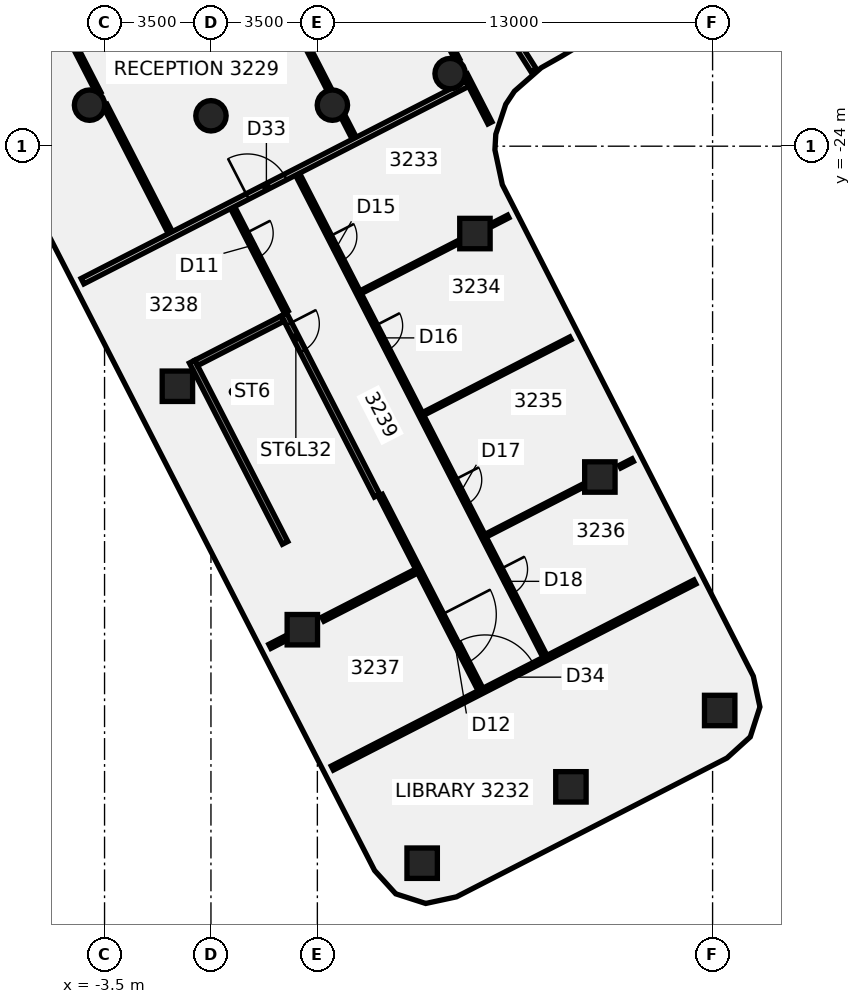
"""IFC4 building model, lengths in metres.
Left out: names, types, materials, properties, quantities, classifications, styles, units other than length and angle.
Written with IfcOpenShell. Run it as: python <this file> out.ifc"""

import sys

from ifc_helpers import new_model, si_unit, direction, frame, frame_2d, origin, origin_2d, place, context, subcontext, project, spatial, polyline, rectangle, circle, outline, extrude, element, fill, save


model = new_model("IFC4")
c1 = context("Model", 3, precision=1e-05, world=origin(), true_north=direction((0.0, 1.0)))
c2 = subcontext(c1, "Body", "Model", "MODEL_VIEW")
j1 = project(units=[si_unit("LENGTHUNIT", "METRE"), si_unit("PLANEANGLEUNIT", "RADIAN")], contexts=[c1])
p1 = place(None, origin())
s1 = spatial("IfcSite", under=j1, at=p1, CompositionType="ELEMENT")
p2 = place(p1, origin())
s2 = spatial("IfcBuilding", under=s1, at=p2, CompositionType="ELEMENT")
p3 = place(p2, frame((0.0, 0.0, 133.0)))
s3 = spatial("IfcBuildingStorey", under=s2, at=p3, CompositionType="ELEMENT", Elevation=133.0)
for number, where, z_axis, x_axis in (
    (1, (-3.994, -22.651, -0.14), (0.0, 0.0, 1.0), (1.0, 0.0, 0.0)),
    (2, (0.0, -23.0, -0.14), (0.0, 0.0, 1.0), (1.0, 0.0, 0.0)),
    (3, (3.994, -22.651, -0.14), (0.0, 0.0, 1.0), (1.0, 0.0, 0.0)),
    (4, (7.866, -21.613, -0.14), (0.0, 0.0, 1.0), (1.0, 0.0, 0.0)),
):
    element("IfcColumn", number, at=place(p3, frame(where, z_axis=z_axis, x_axis=x_axis)), inside=s3, PredefinedType="COLUMN", context=c2, shape_type="SweptSolid", body=[
        extrude(circle(Radius=0.5, at=origin_2d()), origin(), (0.0, 0.0, 1.0), 3.75),
    ])
p4 = place(p3, frame((12.792, -34.88, -0.134), z_axis=(0.061871859426, 0.062521773916, 0.996123938472), x_axis=(-0.887299968667, -0.453556116001, 0.083579993069)))
e5 = element("IfcColumn", 5, at=p4, inside=s3, PredefinedType="COLUMN", context=c2, shape_type="SweptSolid", body=[
    extrude(rectangle(XDim=1.0, YDim=1.0, at=origin_2d()), origin(), (0.0, 0.0, 1.0), 3.757),
])
p5 = place(p3, frame((3.006, -39.903, -0.134), z_axis=(0.086557736741, 0.015336055459, 0.996128788668), x_axis=(-0.455375187571, 0.889923738813, 0.025868468099)))
e6 = element("IfcColumn", 6, at=p5, inside=s3, PredefinedType="COLUMN", context=c2, shape_type="SweptSolid", body=[
    extrude(rectangle(XDim=1.0, YDim=1.0, at=origin_2d()), origin(), (0.0, 0.0, 1.0), 3.757),
])
p6 = place(p3, frame((8.683, -26.873, -0.136), z_axis=(0.023249815242, 0.042396721911, 0.99883029793), x_axis=(-0.888891864763, -0.45636204272, 0.040061686479)))
e7 = element("IfcColumn", 7, at=p6, inside=s3, PredefinedType="COLUMN", context=c2, shape_type="SweptSolid", body=[
    extrude(rectangle(XDim=1.0, YDim=1.0, at=origin_2d()), origin(), (0.0, 0.0, 1.0), 3.749),
])
p7 = place(p3, frame((-1.104, -31.896, -0.136), z_axis=(0.048124572307, -0.004949211766, 0.998829079895), x_axis=(-0.455474581289, 0.889858610868, 0.026354477116)))
e8 = element("IfcColumn", 8, at=p7, inside=s3, PredefinedType="COLUMN", context=c2, shape_type="SweptSolid", body=[
    extrude(rectangle(XDim=1.0, YDim=1.0, at=origin_2d()), origin(), (0.0, 0.0, 1.0), 3.749),
])
p8 = place(p3, frame((6.947, -47.583, -0.131), z_axis=(0.130025765362, 0.021573490305, 0.991275887358), x_axis=(-0.454113091891, 0.890036848371, 0.04019587435)))
e9 = element("IfcColumn", 9, at=p8, inside=s3, PredefinedType="COLUMN", context=c2, shape_type="SweptSolid", body=[
    extrude(rectangle(XDim=1.0, YDim=1.0, at=origin_2d()), origin(), (0.0, 0.0, 1.0), 3.757),
])
p9 = place(p3, frame((11.84, -45.071, -0.133), z_axis=(0.117801332946, 0.045053158792, 0.992014646484), x_axis=(-0.455693217506, 0.890031586101, 0.013691868468)))
e10 = element("IfcColumn", 10, at=p9, inside=s3, PredefinedType="COLUMN", context=c2, shape_type="SweptSolid", body=[
    extrude(rectangle(XDim=1.0, YDim=1.0, at=origin_2d()), origin(), (0.0, 0.0, 1.0), 3.755),
])
p10 = place(p3, frame((16.733, -42.56, -0.132), z_axis=(0.105474361583, 0.068538826824, 0.992057250498), x_axis=(-0.883135905889, -0.452121084233, 0.125129920171)))
e11 = element("IfcColumn", 11, at=p10, inside=s3, PredefinedType="COLUMN", context=c2, shape_type="SweptSolid", body=[
    extrude(rectangle(XDim=1.0, YDim=1.0, at=origin_2d()), origin(), (0.0, 0.0, 1.0), 3.754),
])
p11 = place(p3, frame((-8.956, -11.993, 0.0), z_axis=(0.0, 0.0, 1.0), x_axis=(0.456540854067, -0.889702449456, 0.0)))
e12 = element("IfcWall", 12, at=p11, inside=s3, PredefinedType="PARTITIONING", context=c2, shape_type="SweptSolid", body=[
    extrude(rectangle(XDim=11.539, YDim=0.15, at=frame_2d((5.77, 0.0))), origin(), (0.0, 0.0, 1.0), 3.01),
])
p12 = place(p11, frame((5.195, 0.0, 0.0)))
e13 = element("IfcOpeningElement", 13, at=p12, cuts=e12, PredefinedType="OPENING", context=c2, shape_type="SweptSolid", body=[
    extrude(rectangle(XDim=1.8, YDim=2.1, at=frame_2d((0.9, 1.05))), frame((0.0, 0.085, 0.0), z_axis=(0.0, -1.0, 0.0), x_axis=(1.0, 0.0, 0.0)), (0.0, 0.0, 1.0), 0.17),
])
p13 = place(p3, frame((-3.485, -22.655, 0.0), z_axis=(0.0, 0.0, 1.0), x_axis=(0.456522971759, -0.889711625335, 0.0)))
e14 = element("IfcWall", 14, at=p13, inside=s3, PredefinedType="PARTITIONING", context=c2, shape_type="SweptSolid", body=[
    extrude(rectangle(XDim=4.708, YDim=0.15, at=frame_2d((2.354, 0.0))), origin(), (0.0, 0.0, 1.0), 3.01),
])
p14 = place(p3, frame((-1.313, -11.993, 0.0), z_axis=(0.0, 0.0, 1.0), x_axis=(0.456517816725, -0.889714270433, 0.0)))
e15 = element("IfcWall", 15, at=p14, inside=s3, PredefinedType="PARTITIONING", context=c2, shape_type="SweptSolid", body=[
    extrude(rectangle(XDim=11.432, YDim=0.15, at=frame_2d((5.716, 0.0))), origin(), (0.0, 0.0, 1.0), 3.01),
])
p15 = place(p14, frame((3.645, 0.0, 0.0)))
e16 = element("IfcOpeningElement", 16, at=p15, cuts=e15, PredefinedType="OPENING", context=c2, shape_type="SweptSolid", body=[
    extrude(rectangle(XDim=0.9, YDim=2.1, at=frame_2d((0.45, 1.05))), frame((0.0, 0.085, 0.0), z_axis=(0.0, -1.0, 0.0), x_axis=(1.0, 0.0, 0.0)), (0.0, 0.0, 1.0), 0.17),
])
p16 = place(p3, frame((4.337, -23.004, 0.0), z_axis=(0.0, 0.0, 1.0), x_axis=(0.456575953503, -0.889684437698, 0.0)))
e17 = element("IfcWall", 17, at=p16, inside=s3, PredefinedType="PARTITIONING", context=c2, shape_type="SweptSolid", body=[
    extrude(rectangle(XDim=0.822, YDim=0.15, at=frame_2d((0.411, 0.0))), origin(), (0.0, 0.0, 1.0), 3.01),
])
p17 = place(p3, frame((0.713, -26.018, 0.0), z_axis=(0.0, 0.0, 1.0), x_axis=(0.456676166245, -0.889633002526, 0.0)))
e18 = element("IfcWall", 18, at=p17, inside=s3, PredefinedType="PARTITIONING", context=c2, shape_type="SweptSolid", body=[
    extrude(rectangle(XDim=3.86, YDim=0.15, at=frame_2d((1.93, 0.0))), origin(), (0.0, 0.0, 1.0), 3.01),
])
p18 = place(p17, frame((0.95, 0.0, 0.0)))
e19 = element("IfcOpeningElement", 19, at=p18, cuts=e18, PredefinedType="OPENING", context=c2, shape_type="SweptSolid", body=[
    extrude(rectangle(XDim=0.9, YDim=2.1, at=frame_2d((0.45, 1.05))), frame((0.0, 0.085, 0.0), z_axis=(0.0, -1.0, 0.0), x_axis=(1.0, 0.0, 0.0)), (0.0, 0.0, 1.0), 0.17),
])
p19 = place(p3, frame((5.572, -35.484, 0.0), z_axis=(0.0, 0.0, 1.0), x_axis=(0.456649146852, -0.889646871899, 0.0)))
e20 = element("IfcWall", 20, at=p19, inside=s3, PredefinedType="PARTITIONING", context=c2, shape_type="SweptSolid", body=[
    extrude(rectangle(XDim=7.184, YDim=0.15, at=frame_2d((3.592, 0.0))), origin(), (0.0, 0.0, 1.0), 3.01),
])
p20 = place(p19, frame((4.41, 0.0, 0.0)))
e21 = element("IfcOpeningElement", 21, at=p20, cuts=e20, PredefinedType="OPENING", context=c2, shape_type="SweptSolid", body=[
    extrude(rectangle(XDim=1.8, YDim=2.1, at=frame_2d((0.9, 1.05))), frame((0.0, 0.085, 0.0), z_axis=(0.0, -1.0, 0.0), x_axis=(1.0, 0.0, 0.0)), (0.0, 0.0, 1.0), 0.17),
])
p21 = place(p3, frame((2.849, -24.922, 0.0), z_axis=(0.0, 0.0, 1.0), x_axis=(0.456500214421, -0.889723302063, 0.0)))
e22 = element("IfcWall", 22, at=p21, inside=s3, PredefinedType="PARTITIONING", context=c2, shape_type="SweptSolid", body=[
    extrude(rectangle(XDim=17.82, YDim=0.15, at=frame_2d((8.91, 0.0))), origin(), (0.0, 0.0, 1.0), 3.01),
])
p22 = place(p21, frame((2.3, 0.0, 0.0)))
e23 = element("IfcOpeningElement", 23, at=p22, cuts=e22, PredefinedType="OPENING", context=c2, shape_type="SweptSolid", body=[
    extrude(rectangle(XDim=0.9, YDim=2.1, at=frame_2d((0.45, 1.05))), frame((0.0, 0.085, 0.0), z_axis=(0.0, -1.0, 0.0), x_axis=(1.0, 0.0, 0.0)), (0.0, 0.0, 1.0), 0.17),
])
p23 = place(p21, frame((5.6, 0.0, 0.0)))
e24 = element("IfcOpeningElement", 24, at=p23, cuts=e22, PredefinedType="OPENING", context=c2, shape_type="SweptSolid", body=[
    extrude(rectangle(XDim=0.9, YDim=2.1, at=frame_2d((0.45, 1.05))), frame((0.0, 0.085, 0.0), z_axis=(0.0, -1.0, 0.0), x_axis=(1.0, 0.0, 0.0)), (0.0, 0.0, 1.0), 0.17),
])
p24 = place(p21, frame((11.299, 0.0, 0.0)))
e25 = element("IfcOpeningElement", 25, at=p24, cuts=e22, PredefinedType="OPENING", context=c2, shape_type="SweptSolid", body=[
    extrude(rectangle(XDim=0.9, YDim=2.1, at=frame_2d((0.45, 1.05))), frame((0.0, 0.085, 0.0), z_axis=(0.0, -1.0, 0.0), x_axis=(1.0, 0.0, 0.0)), (0.0, 0.0, 1.0), 0.17),
])
p25 = place(p21, frame((14.6, 0.0, 0.0)))
e26 = element("IfcOpeningElement", 26, at=p25, cuts=e22, PredefinedType="OPENING", context=c2, shape_type="SweptSolid", body=[
    extrude(rectangle(XDim=0.9, YDim=2.1, at=frame_2d((0.45, 1.05))), frame((0.0, 0.085, 0.0), z_axis=(0.0, -1.0, 0.0), x_axis=(1.0, 0.0, 0.0)), (0.0, 0.0, 1.0), 0.17),
])
p26 = place(p3, frame((3.407, -11.993, 0.0), z_axis=(0.0, 0.0, 1.0), x_axis=(0.456609270215, -0.889667339152, 0.0)))
e27 = element("IfcWall", 27, at=p26, inside=s3, PredefinedType="PARTITIONING", context=c2, shape_type="SweptSolid", body=[
    extrude(rectangle(XDim=10.314, YDim=0.15, at=frame_2d((5.157, 0.0))), origin(), (0.0, 0.0, 1.0), 3.01),
])
p27 = place(p3, frame((8.365, -21.655, 0.0), z_axis=(0.0, 0.0, 1.0), x_axis=(0.456704681847, -0.889618364007, 0.0)))
e28 = element("IfcWall", 28, at=p27, inside=s3, PredefinedType="PARTITIONING", context=c2, shape_type="SweptSolid", body=[
    extrude(rectangle(XDim=1.775, YDim=0.15, at=frame_2d((0.888, 0.0))), origin(), (0.0, 0.0, 1.0), 3.01),
])
p28 = place(p3, frame((-4.225, -28.439, 0.0), z_axis=(0.0, 0.0, 1.0), x_axis=(0.889694266908, 0.456556799787, 0.0)))
e29 = element("IfcWall", 29, at=p28, inside=s3, PredefinedType="PARTITIONING", context=c2, shape_type="SweptSolid", body=[
    extrude(rectangle(XDim=14.219, YDim=0.2, at=frame_2d((7.11, 0.0))), origin(), (0.0, 0.0, 1.0), 3.01),
])
p29 = place(p28, frame((6.099, 0.0, 0.0)))
e30 = element("IfcOpeningElement", 30, at=p29, cuts=e29, PredefinedType="OPENING", context=c2, shape_type="SweptSolid", body=[
    extrude(rectangle(XDim=1.4, YDim=2.1, at=frame_2d((0.7, 1.05))), frame((0.0, 0.11, 0.0), z_axis=(0.0, -1.0, 0.0), x_axis=(1.0, 0.0, 0.0)), (0.0, 0.0, 1.0), 0.22),
])
p30 = place(p3, frame((1.938, -40.45, 0.0), z_axis=(0.0, 0.0, 1.0), x_axis=(0.889784233191, 0.456381439549, 0.0)))
e31 = element("IfcWall", 31, at=p30, inside=s3, PredefinedType="PARTITIONING", context=c2, shape_type="SweptSolid", body=[
    extrude(rectangle(XDim=0.765, YDim=0.15, at=frame_2d((0.382, 0.0))), origin(), (0.0, 0.0, 1.0), 3.01),
])
p31 = place(p3, frame((3.683, -39.555, 0.0), z_axis=(0.0, 0.0, 1.0), x_axis=(0.889712502977, 0.456521261331, 0.0)))
e32 = element("IfcWall", 32, at=p31, inside=s3, PredefinedType="PARTITIONING", context=c2, shape_type="SweptSolid", body=[
    extrude(rectangle(XDim=3.464, YDim=0.15, at=frame_2d((1.732, 0.0))), origin(), (0.0, 0.0, 1.0), 3.01),
])
p32 = place(p3, frame((9.033, -36.81, 0.0), z_axis=(0.0, 0.0, 1.0), x_axis=(0.889728687262, 0.456489718464, 0.0)))
e33 = element("IfcWall", 33, at=p32, inside=s3, PredefinedType="PARTITIONING", context=c2, shape_type="SweptSolid", body=[
    extrude(rectangle(XDim=3.78, YDim=0.1, at=frame_2d((1.89, 0.0))), origin(), (0.0, 0.0, 1.0), 3.01),
])
p33 = place(p3, frame((13.458, -34.54, 0.0), z_axis=(0.0, 0.0, 1.0), x_axis=(0.889768357332, 0.456412390598, 0.0)))
e34 = element("IfcWall", 34, at=p33, inside=s3, PredefinedType="PARTITIONING", context=c2, shape_type="SweptSolid", body=[
    extrude(rectangle(XDim=0.466, YDim=0.1, at=frame_2d((0.233, 0.0))), origin(), (0.0, 0.0, 1.0), 3.01),
])
p34 = place(p3, frame((3.993, -44.454, 0.0), z_axis=(0.0, 0.0, 1.0), x_axis=(0.889693799485, 0.456557710655, 0.0)))
e35 = element("IfcWall", 35, at=p34, inside=s3, PredefinedType="PARTITIONING", context=c2, shape_type="SweptSolid", body=[
    extrude(rectangle(XDim=13.405, YDim=0.15, at=frame_2d((6.703, 0.0))), origin(), (0.0, 0.0, 1.0), 3.01),
])
p35 = place(p34, frame((5.649, 0.0, 0.0)))
e36 = element("IfcOpeningElement", 36, at=p35, cuts=e35, PredefinedType="OPENING", context=c2, shape_type="SweptSolid", body=[
    extrude(rectangle(XDim=1.8, YDim=2.1, at=frame_2d((0.9, 1.05))), frame((0.0, 0.085, 0.0), z_axis=(0.0, -1.0, 0.0), x_axis=(1.0, 0.0, 0.0)), (0.0, 0.0, 1.0), 0.17),
])
p36 = place(p3, frame((4.928, -28.801, 0.0), z_axis=(0.0, 0.0, 1.0), x_axis=(0.88969767161, 0.456550164968, 0.0)))
e37 = element("IfcWall", 37, at=p36, inside=s3, PredefinedType="PARTITIONING", context=c2, shape_type="SweptSolid", body=[
    extrude(rectangle(XDim=3.693, YDim=0.1, at=frame_2d((1.846, 0.0))), origin(), (0.0, 0.0, 1.0), 3.01),
])
p37 = place(p3, frame((9.276, -26.57, 0.0), z_axis=(0.0, 0.0, 1.0), x_axis=(0.889533786381, 0.456869393686, 0.0)))
e38 = element("IfcWall", 38, at=p37, inside=s3, PredefinedType="PARTITIONING", context=c2, shape_type="SweptSolid", body=[
    extrude(rectangle(XDim=0.565, YDim=0.1, at=frame_2d((0.282, 0.0))), origin(), (0.0, 0.0, 1.0), 3.01),
])
p38 = place(p3, frame((6.982, -32.803, 0.0), z_axis=(0.0, 0.0, 1.0), x_axis=(0.889704900223, 0.456536078004, 0.0)))
e39 = element("IfcWall", 39, at=p38, inside=s3, PredefinedType="PARTITIONING", context=c2, shape_type="SweptSolid", body=[
    extrude(rectangle(XDim=5.443, YDim=0.1, at=frame_2d((2.722, 0.0))), origin(), (0.0, 0.0, 1.0), 3.01),
])
p39 = place(p3, frame((8.073, -17.482, 0.0), z_axis=(0.0, 0.0, 1.0), x_axis=(0.534101065581, -0.845420635982, 0.0)))
e40 = element("IfcWall", 40, at=p39, inside=s3, PredefinedType="SOLIDWALL", context=c2, shape_type="SweptSolid", body=[
    extrude(rectangle(XDim=4.759, YDim=0.2, at=frame_2d((2.38, 0.0))), origin(), (0.0, 0.0, 1.0), 3.61),
])
p40 = place(p3, frame((2.405, -29.533, -0.14), z_axis=(0.0, 0.0, 1.0), x_axis=(0.456546705756, -0.889699446703, 0.0)))
e41 = element("IfcWall", 41, at=p40, inside=s3, PredefinedType="SHEAR", context=c2, shape_type="SweptSolid", body=[
    extrude(rectangle(XDim=6.7, YDim=0.2, at=frame_2d((3.35, 0.0))), origin(), (0.0, 0.0, 1.0), 3.15),
])
p41 = place(p40, frame((0.35, 0.0, 0.0)))
e42 = element("IfcOpeningElement", 42, at=p41, cuts=e41, PredefinedType="OPENING", context=c2, shape_type="SweptSolid", body=[
    extrude(rectangle(XDim=1.0, YDim=2.1, at=frame_2d((0.5, 1.05))), frame((0.0, 0.11, 0.0), z_axis=(0.0, -1.0, 0.0), x_axis=(1.0, 0.0, 0.0)), (0.0, 0.0, 1.0), 0.22),
])
p42 = place(p3, frame((-0.621, -31.085, -0.14), z_axis=(0.0, 0.0, 1.0), x_axis=(0.456575549033, -0.889684645268, 0.0)))
e43 = element("IfcWall", 43, at=p42, inside=s3, PredefinedType="SHEAR", context=c2, shape_type="SweptSolid", body=[
    extrude(rectangle(XDim=6.7, YDim=0.2, at=frame_2d((3.35, 0.0))), origin(), (0.0, 0.0, 1.0), 3.15),
])
p43 = place(p3, frame((-0.486, -31.129, -0.14), z_axis=(0.0, 0.0, 1.0), x_axis=(0.889693512727, 0.456558269459, 0.0)))
e44 = element("IfcWall", 44, at=p43, inside=s3, PredefinedType="SHEAR", context=c2, shape_type="SweptSolid", body=[
    extrude(rectangle(XDim=3.2, YDim=0.2, at=frame_2d((1.6, 0.0))), origin(), (0.0, 0.0, 1.0), 3.15),
])
p44 = place(p3, frame((0.0, 0.0, -0.14)))
e45 = element("IfcWall", 45, at=p44, inside=s3, PredefinedType="SHEAR", context=c2, shape_type="SweptSolid", body=[
    extrude(outline(polyline([(2.436, -36.823), (2.527, -37.001), (5.375, -35.54), (5.283, -35.362), (2.436, -36.823)])), origin(), (0.0, 0.0, 1.0), 3.15),
])
p45 = place(p18, frame((0.9, 0.0, 0.0), z_axis=(0.0, 0.0, 1.0), x_axis=(-1.0, 0.0, 0.0)))
e46 = element("IfcDoor", 46, at=p45, inside=s3, OperationType="SINGLE_SWING_LEFT", PredefinedType="DOOR", context=c2, shape_type="SweptSolid", body=[
    extrude(rectangle(XDim=0.9, YDim=2.1, at=frame_2d((0.45, 1.05))), frame((0.0, 0.025, 0.0), z_axis=(0.0, -1.0, 0.0), x_axis=(1.0, 0.0, 0.0)), (0.0, 0.0, 1.0), 0.05),
])
fill(e19, e46)
p46 = place(p20, frame((1.8, 0.0, 0.0), z_axis=(0.0, 0.0, 1.0), x_axis=(-1.0, 0.0, 0.0)))
e47 = element("IfcDoor", 47, at=p46, inside=s3, OperationType="DOUBLE_DOOR_SINGLE_SWING", PredefinedType="DOOR", context=c2, shape_type="SweptSolid", body=[
    extrude(rectangle(XDim=1.8, YDim=2.1, at=frame_2d((0.9, 1.05))), frame((0.0, 0.025, 0.0), z_axis=(0.0, -1.0, 0.0), x_axis=(1.0, 0.0, 0.0)), (0.0, 0.0, 1.0), 0.05),
])
fill(e21, e47)
p47 = place(p22, origin())
e48 = element("IfcDoor", 48, at=p47, inside=s3, OperationType="SINGLE_SWING_RIGHT", PredefinedType="DOOR", context=c2, shape_type="SweptSolid", body=[
    extrude(rectangle(XDim=0.9, YDim=2.1, at=frame_2d((0.45, 1.05))), frame((0.0, 0.025, 0.0), z_axis=(0.0, -1.0, 0.0), x_axis=(1.0, 0.0, 0.0)), (0.0, 0.0, 1.0), 0.05),
])
fill(e23, e48)
p48 = place(p23, origin())
e49 = element("IfcDoor", 49, at=p48, inside=s3, OperationType="SINGLE_SWING_RIGHT", PredefinedType="DOOR", context=c2, shape_type="SweptSolid", body=[
    extrude(rectangle(XDim=0.9, YDim=2.1, at=frame_2d((0.45, 1.05))), frame((0.0, 0.025, 0.0), z_axis=(0.0, -1.0, 0.0), x_axis=(1.0, 0.0, 0.0)), (0.0, 0.0, 1.0), 0.05),
])
fill(e24, e49)
p49 = place(p24, origin())
e50 = element("IfcDoor", 50, at=p49, inside=s3, OperationType="SINGLE_SWING_LEFT", PredefinedType="DOOR", context=c2, shape_type="SweptSolid", body=[
    extrude(rectangle(XDim=0.9, YDim=2.1, at=frame_2d((0.45, 1.05))), frame((0.0, 0.025, 0.0), z_axis=(0.0, -1.0, 0.0), x_axis=(1.0, 0.0, 0.0)), (0.0, 0.0, 1.0), 0.05),
])
fill(e25, e50)
p50 = place(p25, origin())
e51 = element("IfcDoor", 51, at=p50, inside=s3, OperationType="SINGLE_SWING_LEFT", PredefinedType="DOOR", context=c2, shape_type="SweptSolid", body=[
    extrude(rectangle(XDim=0.9, YDim=2.1, at=frame_2d((0.45, 1.05))), frame((0.0, 0.025, 0.0), z_axis=(0.0, -1.0, 0.0), x_axis=(1.0, 0.0, 0.0)), (0.0, 0.0, 1.0), 0.05),
])
fill(e26, e51)
p51 = place(p29, origin())
e52 = element("IfcDoor", 52, at=p51, inside=s3, OperationType="DOUBLE_DOOR_SINGLE_SWING", PredefinedType="DOOR", context=c2, shape_type="SweptSolid", body=[
    extrude(rectangle(XDim=1.4, YDim=2.1, at=frame_2d((0.7, 1.05))), frame((0.0, 0.025, 0.0), z_axis=(0.0, -1.0, 0.0), x_axis=(1.0, 0.0, 0.0)), (0.0, 0.0, 1.0), 0.05),
])
fill(e30, e52)
p52 = place(p35, frame((1.8, 0.0, 0.0), z_axis=(0.0, 0.0, 1.0), x_axis=(-1.0, 0.0, 0.0)))
e53 = element("IfcDoor", 53, at=p52, inside=s3, OperationType="DOUBLE_DOOR_SINGLE_SWING", PredefinedType="DOOR", context=c2, shape_type="SweptSolid", body=[
    extrude(rectangle(XDim=1.8, YDim=2.1, at=frame_2d((0.9, 1.05))), frame((0.0, 0.025, 0.0), z_axis=(0.0, -1.0, 0.0), x_axis=(1.0, 0.0, 0.0)), (0.0, 0.0, 1.0), 0.05),
])
fill(e36, e53)
p53 = place(p41, origin())
e54 = element("IfcDoor", 54, at=p53, inside=s3, OperationType="SINGLE_SWING_LEFT", PredefinedType="DOOR", context=c2, shape_type="SweptSolid", body=[
    extrude(rectangle(XDim=1.0, YDim=2.1, at=frame_2d((0.5, 1.05))), frame((0.0, 0.025, 0.0), z_axis=(0.0, -1.0, 0.0), x_axis=(1.0, 0.0, 0.0)), (0.0, 0.0, 1.0), 0.05),
])
fill(e42, e54)
save(model, sys.argv[1])
